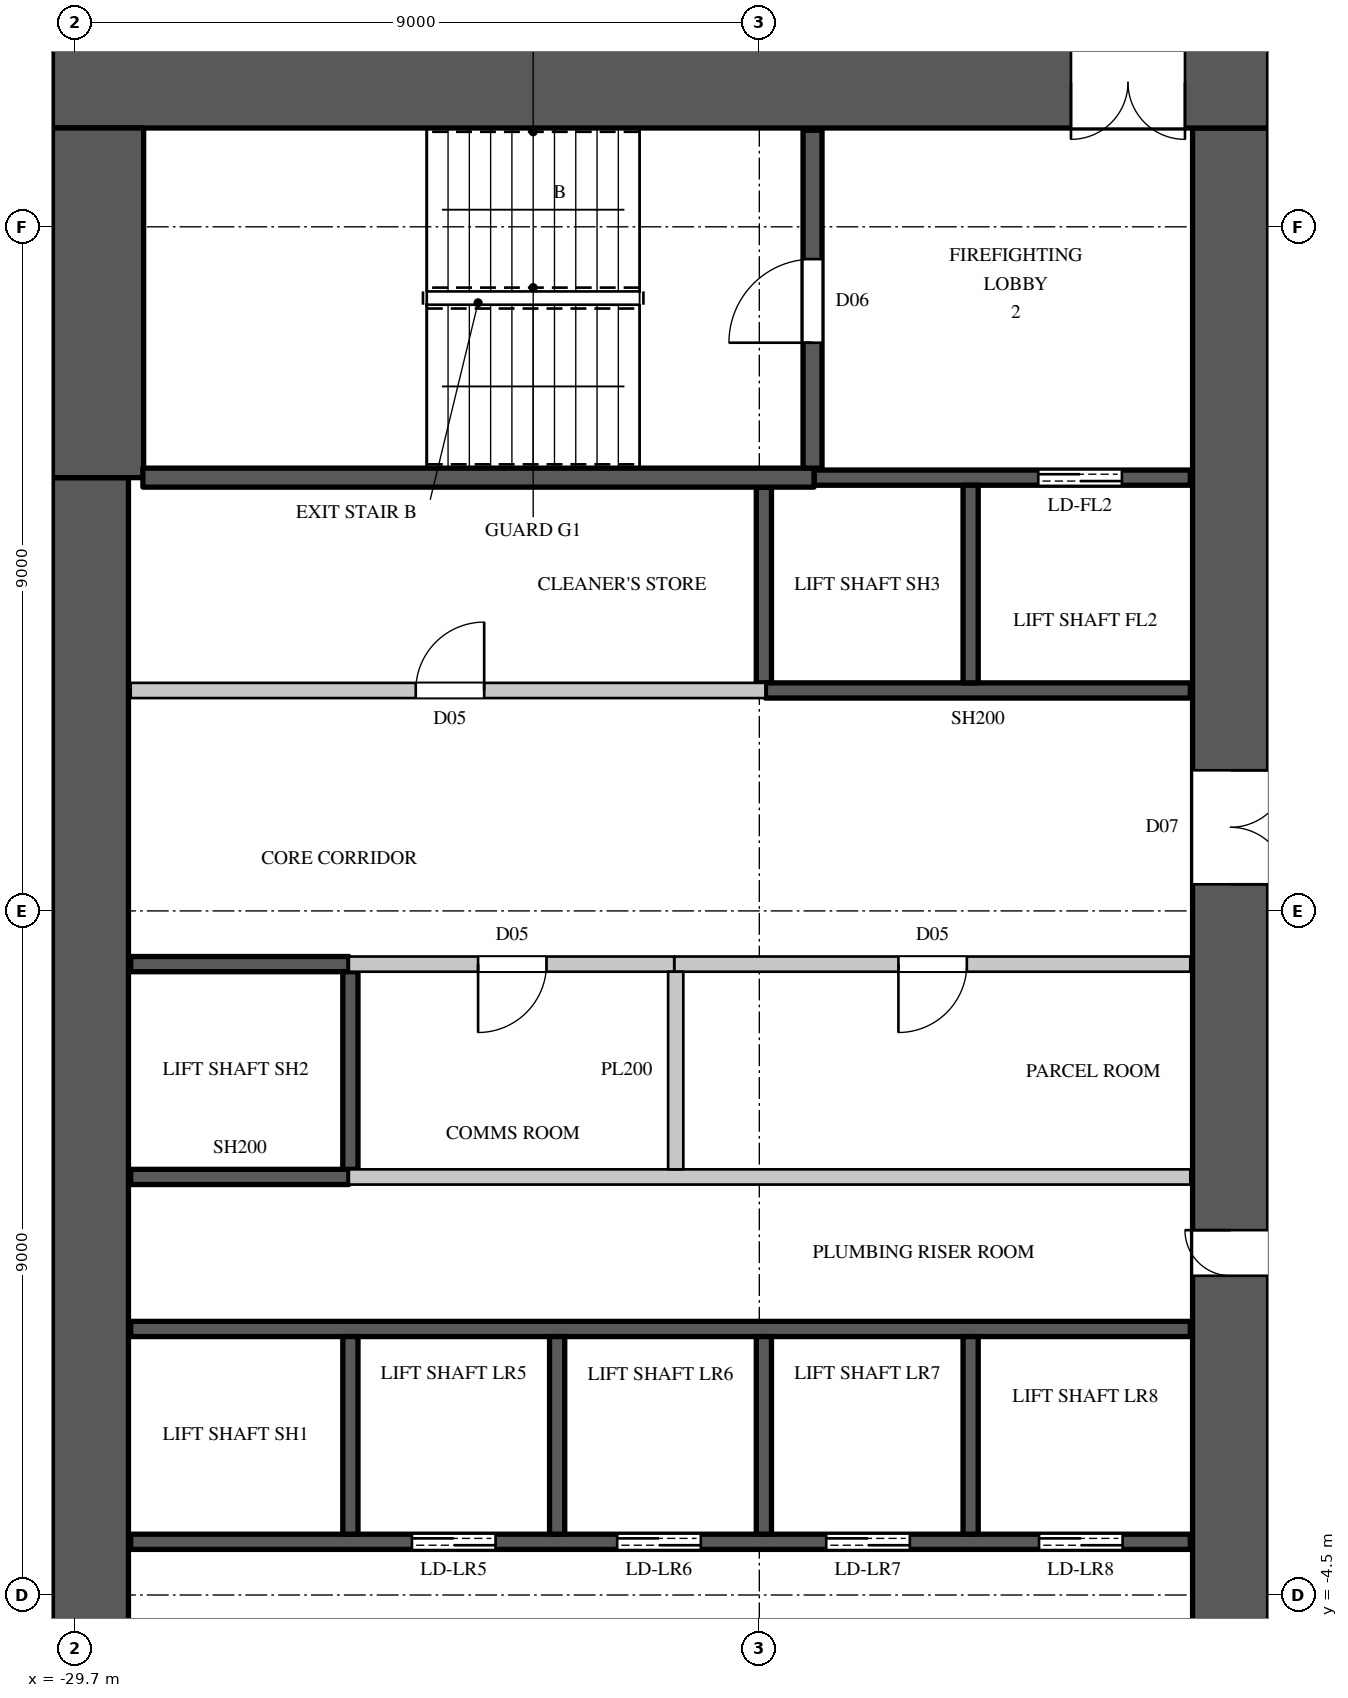
"""IFC4 building model, lengths in metres.
Left out: names, types, materials, properties, quantities, classifications, styles, units other than length and angle.
Written with IfcOpenShell. Run it as: python <this file> out.ifc"""

import sys

from ifc_helpers import new_model, si_unit, direction, frame, frame_2d, origin, place, context, subcontext, project, spatial, rectangle, extrude, element, fill, save


model = new_model("IFC4")
c1 = context("Model", 3, precision=1e-05, world=origin(), true_north=direction((0.0, 1.0)))
c2 = subcontext(c1, "Body", "Model", "MODEL_VIEW")
j1 = project(units=[si_unit("LENGTHUNIT", "METRE"), si_unit("PLANEANGLEUNIT", "RADIAN")], contexts=[c1])
p1 = place(None, origin())
s1 = spatial("IfcSite", under=j1, at=p1, CompositionType="ELEMENT")
p2 = place(p1, origin())
s2 = spatial("IfcBuilding", under=s1, at=p2, CompositionType="ELEMENT")
p3 = place(p2, frame((0.0, 0.0, 102.3)))
s3 = spatial("IfcBuildingStorey", under=s2, at=p3, CompositionType="ELEMENT", Elevation=102.3)
p4 = place(p3, frame((-30.0, 15.4, 0.0), z_axis=(0.0, 0.0, 1.0), x_axis=(1.0, 0.0, 0.0)))
e1 = element("IfcWall", 1, at=p4, inside=s3, PredefinedType="SHEAR", context=c2, shape_type="SweptSolid", body=[
    extrude(rectangle(XDim=16.0, YDim=1.2, at=frame_2d((8.0, 0.0))), origin(), (0.0, 0.0, 1.0), 3.6),
])
p5 = place(p4, frame((13.4, 0.0, 0.0)))
e2 = element("IfcOpeningElement", 2, at=p5, cuts=e1, PredefinedType="OPENING", context=c2, shape_type="SweptSolid", body=[
    extrude(rectangle(XDim=1.5, YDim=2.4, at=frame_2d((0.75, 1.2))), frame((0.0, 0.61, 0.0), z_axis=(0.0, -1.0, 0.0), x_axis=(1.0, 0.0, 0.0)), (0.0, 0.0, 1.0), 1.22),
])
p6 = place(p3, frame((-14.5, -14.8, 0.0), z_axis=(0.0, 0.0, 1.0), x_axis=(0.0, 1.0, 0.0)))
e3 = element("IfcWall", 3, at=p6, inside=s3, PredefinedType="SHEAR", context=c2, shape_type="SweptSolid", body=[
    extrude(rectangle(XDim=29.6, YDim=1.0, at=frame_2d((14.8, 0.0))), origin(), (0.0, 0.0, 1.0), 3.6),
])
p7 = place(p6, frame((8.45, 0.0, 0.0)))
e4 = element("IfcOpeningElement", 4, at=p7, cuts=e3, PredefinedType="OPENING", context=c2, shape_type="SweptSolid", body=[
    extrude(rectangle(XDim=1.5, YDim=2.4, at=frame_2d((0.75, 1.2))), frame((0.0, 0.51, 0.0), z_axis=(0.0, -1.0, 0.0), x_axis=(1.0, 0.0, 0.0)), (0.0, 0.0, 1.0), 1.02),
])
p8 = place(p6, frame((19.65, 0.0, 0.0)))
e5 = element("IfcOpeningElement", 5, at=p8, cuts=e3, PredefinedType="OPENING", context=c2, shape_type="SweptSolid", body=[
    extrude(rectangle(XDim=1.5, YDim=2.4, at=frame_2d((0.75, 1.2))), frame((0.0, 0.51, 0.0), z_axis=(0.0, -1.0, 0.0), x_axis=(1.0, 0.0, 0.0)), (0.0, 0.0, 1.0), 1.02),
])
p9 = place(p6, frame((14.5, 0.0, 0.0)))
e6 = element("IfcOpeningElement", 6, at=p9, cuts=e3, PredefinedType="OPENING", context=c2, shape_type="SweptSolid", body=[
    extrude(rectangle(XDim=0.6, YDim=2.0, at=frame_2d((0.3, 1.0))), frame((0.0, 0.51, 0.0), z_axis=(0.0, -1.0, 0.0), x_axis=(1.0, 0.0, 0.0)), (0.0, 0.0, 1.0), 1.02),
])
p10 = place(p3, frame((-29.5, -10.2, 0.0), z_axis=(0.0, 0.0, 1.0), x_axis=(0.0, 1.0, 0.0)))
e7 = element("IfcWall", 7, at=p10, inside=s3, PredefinedType="SHEAR", context=c2, shape_type="SweptSolid", body=[
    extrude(rectangle(XDim=20.4, YDim=1.0, at=frame_2d((10.2, 0.0))), origin(), (0.0, 0.0, 1.0), 3.6),
])
p11 = place(p3, frame((-29.4, 10.2, 0.0), z_axis=(0.0, 0.0, 1.0), x_axis=(0.0, 1.0, 0.0)))
e8 = element("IfcWall", 8, at=p11, inside=s3, PredefinedType="SHEAR", context=c2, shape_type="SweptSolid", body=[
    extrude(rectangle(XDim=4.6, YDim=1.2, at=frame_2d((2.3, 0.0))), origin(), (0.0, 0.0, 1.0), 3.6),
])
p12 = place(p3, frame((-28.97, 7.4, 0.0), z_axis=(0.0, 0.0, 1.0), x_axis=(1.0, 0.0, 0.0)))
e9 = element("IfcWall", 9, at=p12, inside=s3, PredefinedType="PARTITIONING", context=c2, shape_type="SweptSolid", body=[
    extrude(rectangle(XDim=8.35, YDim=0.2, at=frame_2d((4.175, 0.0))), origin(), (0.0, 0.0, 1.0), 3.3),
])
p13 = place(p12, frame((3.75, 0.0, 0.0)))
e10 = element("IfcOpeningElement", 10, at=p13, cuts=e9, PredefinedType="OPENING", context=c2, shape_type="SweptSolid", body=[
    extrude(rectangle(XDim=0.9, YDim=2.2, at=frame_2d((0.45, 1.1))), frame((0.0, 0.11, 0.0), z_axis=(0.0, -1.0, 0.0), x_axis=(1.0, 0.0, 0.0)), (0.0, 0.0, 1.0), 0.22),
])
p14 = place(p3, frame((-21.82, 3.8, 0.0), z_axis=(0.0, 0.0, 1.0), x_axis=(1.0, 0.0, 0.0)))
e11 = element("IfcWall", 11, at=p14, inside=s3, PredefinedType="PARTITIONING", context=c2, shape_type="SweptSolid", body=[
    extrude(rectangle(XDim=6.79, YDim=0.2, at=frame_2d((3.395, 0.0))), origin(), (0.0, 0.0, 1.0), 3.3),
])
p15 = place(p14, frame((2.95, 0.0, 0.0)))
e12 = element("IfcOpeningElement", 12, at=p15, cuts=e11, PredefinedType="OPENING", context=c2, shape_type="SweptSolid", body=[
    extrude(rectangle(XDim=0.9, YDim=2.2, at=frame_2d((0.45, 1.1))), frame((0.0, 0.11, 0.0), z_axis=(0.0, -1.0, 0.0), x_axis=(1.0, 0.0, 0.0)), (0.0, 0.0, 1.0), 0.22),
])
p16 = place(p3, frame((-26.1, 1.0, 0.0), z_axis=(0.0, 0.0, 1.0), x_axis=(1.0, 0.0, 0.0)))
e13 = element("IfcWall", 13, at=p16, inside=s3, PredefinedType="PARTITIONING", context=c2, shape_type="SweptSolid", body=[
    extrude(rectangle(XDim=11.07, YDim=0.2, at=frame_2d((5.535, 0.0))), origin(), (0.0, 0.0, 1.0), 3.3),
])
p17 = place(p3, frame((-26.1, 3.8, 0.0), z_axis=(0.0, 0.0, 1.0), x_axis=(1.0, 0.0, 0.0)))
e14 = element("IfcWall", 14, at=p17, inside=s3, PredefinedType="PARTITIONING", context=c2, shape_type="SweptSolid", body=[
    extrude(rectangle(XDim=4.28, YDim=0.2, at=frame_2d((2.14, 0.0))), origin(), (0.0, 0.0, 1.0), 3.3),
])
p18 = place(p17, frame((1.7, 0.0, 0.0)))
e15 = element("IfcOpeningElement", 15, at=p18, cuts=e14, PredefinedType="OPENING", context=c2, shape_type="SweptSolid", body=[
    extrude(rectangle(XDim=0.9, YDim=2.2, at=frame_2d((0.45, 1.1))), frame((0.0, 0.11, 0.0), z_axis=(0.0, -1.0, 0.0), x_axis=(1.0, 0.0, 0.0)), (0.0, 0.0, 1.0), 0.22),
])
p19 = place(p3, frame((-21.8, 1.1, 0.0), z_axis=(0.0, 0.0, 1.0), x_axis=(0.0, 1.0, 0.0)))
e16 = element("IfcWall", 16, at=p19, inside=s3, PredefinedType="PARTITIONING", context=c2, shape_type="SweptSolid", body=[
    extrude(rectangle(XDim=2.6, YDim=0.2, at=frame_2d((1.3, 0.0))), origin(), (0.0, 0.0, 1.0), 3.3),
])
p20 = place(p3, frame((-28.97, -3.8, 0.0), z_axis=(0.0, 0.0, 1.0), x_axis=(1.0, 0.0, 0.0)))
e17 = element("IfcWall", 17, at=p20, inside=s3, PredefinedType="SHEAR", context=c2, shape_type="SweptSolid", body=[
    extrude(rectangle(XDim=13.94, YDim=0.2, at=frame_2d((6.97, 0.0))), origin(), (0.0, 0.0, 1.0), 3.3),
])
p21 = place(p20, frame((3.7, 0.0, 0.0)))
e18 = element("IfcOpeningElement", 18, at=p21, cuts=e17, PredefinedType="OPENING", context=c2, shape_type="SweptSolid", body=[
    extrude(rectangle(XDim=1.1, YDim=2.2, at=frame_2d((0.55, 1.1))), frame((0.0, 0.11, 0.0), z_axis=(0.0, -1.0, 0.0), x_axis=(1.0, 0.0, 0.0)), (0.0, 0.0, 1.0), 0.22),
])
p22 = place(p20, frame((6.4, 0.0, 0.0)))
e19 = element("IfcOpeningElement", 19, at=p22, cuts=e17, PredefinedType="OPENING", context=c2, shape_type="SweptSolid", body=[
    extrude(rectangle(XDim=1.1, YDim=2.2, at=frame_2d((0.55, 1.1))), frame((0.0, 0.11, 0.0), z_axis=(0.0, -1.0, 0.0), x_axis=(1.0, 0.0, 0.0)), (0.0, 0.0, 1.0), 0.22),
])
p23 = place(p20, frame((9.15, 0.0, 0.0)))
e20 = element("IfcOpeningElement", 20, at=p23, cuts=e17, PredefinedType="OPENING", context=c2, shape_type="SweptSolid", body=[
    extrude(rectangle(XDim=1.1, YDim=2.2, at=frame_2d((0.55, 1.1))), frame((0.0, 0.11, 0.0), z_axis=(0.0, -1.0, 0.0), x_axis=(1.0, 0.0, 0.0)), (0.0, 0.0, 1.0), 0.22),
])
p24 = place(p20, frame((11.95, 0.0, 0.0)))
e21 = element("IfcOpeningElement", 21, at=p24, cuts=e17, PredefinedType="OPENING", context=c2, shape_type="SweptSolid", body=[
    extrude(rectangle(XDim=1.1, YDim=2.2, at=frame_2d((0.55, 1.1))), frame((0.0, 0.11, 0.0), z_axis=(0.0, -1.0, 0.0), x_axis=(1.0, 0.0, 0.0)), (0.0, 0.0, 1.0), 0.22),
])
p25 = place(p3, frame((-28.97, -1.0, 0.0), z_axis=(0.0, 0.0, 1.0), x_axis=(1.0, 0.0, 0.0)))
e22 = element("IfcWall", 22, at=p25, inside=s3, PredefinedType="SHEAR", context=c2, shape_type="SweptSolid", body=[
    extrude(rectangle(XDim=13.94, YDim=0.2, at=frame_2d((6.97, 0.0))), origin(), (0.0, 0.0, 1.0), 3.3),
])
for number, where, z_axis, x_axis in (
    (23, (-28.97, 1.0, 0.0), (0.0, 0.0, 1.0), (1.0, 0.0, 0.0)),
    (24, (-28.97, 3.8, 0.0), (0.0, 0.0, 1.0), (1.0, 0.0, 0.0)),
):
    element("IfcWall", number, at=place(p3, frame(where, z_axis=z_axis, x_axis=x_axis)), inside=s3, PredefinedType="SHEAR", context=c2, shape_type="SweptSolid", body=[
        extrude(rectangle(XDim=2.87, YDim=0.2, at=frame_2d((1.435, 0.0))), origin(), (0.0, 0.0, 1.0), 3.3),
    ])
p26 = place(p3, frame((-26.08, -3.7, 0.0), z_axis=(0.0, 0.0, 1.0), x_axis=(0.0, 1.0, 0.0)))
e25 = element("IfcWall", 25, at=p26, inside=s3, PredefinedType="SHEAR", context=c2, shape_type="SweptSolid", body=[
    extrude(rectangle(XDim=2.6, YDim=0.2, at=frame_2d((1.3, 0.0))), origin(), (0.0, 0.0, 1.0), 3.6),
])
p27 = place(p3, frame((-26.08, 1.1, 0.0), z_axis=(0.0, 0.0, 1.0), x_axis=(0.0, 1.0, 0.0)))
e26 = element("IfcWall", 26, at=p27, inside=s3, PredefinedType="SHEAR", context=c2, shape_type="SweptSolid", body=[
    extrude(rectangle(XDim=2.6, YDim=0.2, at=frame_2d((1.3, 0.0))), origin(), (0.0, 0.0, 1.0), 3.3),
])
for number, where, z_axis, x_axis in (
    (27, (-23.36, -3.7, 0.0), (0.0, 0.0, 1.0), (0.0, 1.0, 0.0)),
    (28, (-20.64, -3.7, 0.0), (0.0, 0.0, 1.0), (0.0, 1.0, 0.0)),
):
    element("IfcWall", number, at=place(p3, frame(where, z_axis=z_axis, x_axis=x_axis)), inside=s3, PredefinedType="SHEAR", context=c2, shape_type="SweptSolid", body=[
        extrude(rectangle(XDim=2.6, YDim=0.2, at=frame_2d((1.3, 0.0))), origin(), (0.0, 0.0, 1.0), 3.6),
    ])
p28 = place(p3, frame((-20.64, 7.5, 0.0), z_axis=(0.0, 0.0, 1.0), x_axis=(0.0, 1.0, 0.0)))
e29 = element("IfcWall", 29, at=p28, inside=s3, PredefinedType="SHEAR", context=c2, shape_type="SweptSolid", body=[
    extrude(rectangle(XDim=2.575, YDim=0.2, at=frame_2d((1.288, 0.0))), origin(), (0.0, 0.0, 1.0), 3.3),
])
p29 = place(p3, frame((-20.62, 7.4, 0.0), z_axis=(0.0, 0.0, 1.0), x_axis=(1.0, 0.0, 0.0)))
e30 = element("IfcWall", 30, at=p29, inside=s3, PredefinedType="SHEAR", context=c2, shape_type="SweptSolid", body=[
    extrude(rectangle(XDim=5.59, YDim=0.2, at=frame_2d((2.795, 0.0))), origin(), (0.0, 0.0, 1.0), 3.3),
])
p30 = place(p3, frame((-19.98, 10.2, 0.0), z_axis=(0.0, 0.0, 1.0), x_axis=(1.0, 0.0, 0.0)))
e31 = element("IfcWall", 31, at=p30, inside=s3, PredefinedType="SHEAR", context=c2, shape_type="SweptSolid", body=[
    extrude(rectangle(XDim=4.95, YDim=0.2, at=frame_2d((2.475, 0.0))), origin(), (0.0, 0.0, 1.0), 3.3),
])
p31 = place(p30, frame((2.95, 0.0, 0.0)))
e32 = element("IfcOpeningElement", 32, at=p31, cuts=e31, PredefinedType="OPENING", context=c2, shape_type="SweptSolid", body=[
    extrude(rectangle(XDim=1.1, YDim=2.2, at=frame_2d((0.55, 1.1))), frame((0.0, 0.11, 0.0), z_axis=(0.0, -1.0, 0.0), x_axis=(1.0, 0.0, 0.0)), (0.0, 0.0, 1.0), 0.22),
])
p32 = place(p3, frame((-17.92, -3.7, 0.0), z_axis=(0.0, 0.0, 1.0), x_axis=(0.0, 1.0, 0.0)))
e33 = element("IfcWall", 33, at=p32, inside=s3, PredefinedType="SHEAR", context=c2, shape_type="SweptSolid", body=[
    extrude(rectangle(XDim=2.6, YDim=0.2, at=frame_2d((1.3, 0.0))), origin(), (0.0, 0.0, 1.0), 3.6),
])
p33 = place(p3, frame((-17.92, 7.5, 0.0), z_axis=(0.0, 0.0, 1.0), x_axis=(0.0, 1.0, 0.0)))
e34 = element("IfcWall", 34, at=p33, inside=s3, PredefinedType="SHEAR", context=c2, shape_type="SweptSolid", body=[
    extrude(rectangle(XDim=2.6, YDim=0.2, at=frame_2d((1.3, 0.0))), origin(), (0.0, 0.0, 1.0), 3.6),
])
p34 = place(p3, frame((-28.81, 10.2, 0.0), z_axis=(0.0, 0.0, 1.0), x_axis=(1.0, 0.0, 0.0)))
e35 = element("IfcWall", 35, at=p34, inside=s3, PredefinedType="SHEAR", context=c2, shape_type="SweptSolid", body=[
    extrude(rectangle(XDim=8.83, YDim=0.25, at=frame_2d((4.415, 0.0))), origin(), (0.0, 0.0, 1.0), 3.3),
])
p35 = place(p3, frame((-20.0, 10.325, 0.0), z_axis=(0.0, 0.0, 1.0), x_axis=(0.0, 1.0, 0.0)))
e36 = element("IfcWall", 36, at=p35, inside=s3, PredefinedType="SHEAR", context=c2, shape_type="SweptSolid", body=[
    extrude(rectangle(XDim=4.445, YDim=0.25, at=frame_2d((2.223, 0.0))), origin(), (0.0, 0.0, 1.0), 3.3),
])
p36 = place(p35, frame((1.65, 0.0, 0.0)))
e37 = element("IfcOpeningElement", 37, at=p36, cuts=e36, PredefinedType="OPENING", context=c2, shape_type="SweptSolid", body=[
    extrude(rectangle(XDim=1.1, YDim=2.2, at=frame_2d((0.55, 1.1))), frame((0.0, 0.135, 0.0), z_axis=(0.0, -1.0, 0.0), x_axis=(1.0, 0.0, 0.0)), (0.0, 0.0, 1.0), 0.27),
])
p37 = place(p36, origin())
e38 = element("IfcDoor", 38, at=p37, inside=s3, OperationType="SINGLE_SWING_LEFT", PredefinedType="DOOR", context=c2, shape_type="SweptSolid", body=[
    extrude(rectangle(XDim=1.1, YDim=2.2, at=frame_2d((0.55, 1.1))), frame((0.0, 0.025, 0.0), z_axis=(0.0, -1.0, 0.0), x_axis=(1.0, 0.0, 0.0)), (0.0, 0.0, 1.0), 0.05),
])
fill(e37, e38)
p38 = place(p18, origin())
e39 = element("IfcDoor", 39, at=p38, inside=s3, OperationType="SINGLE_SWING_RIGHT", PredefinedType="DOOR", context=c2, shape_type="SweptSolid", body=[
    extrude(rectangle(XDim=0.9, YDim=2.2, at=frame_2d((0.45, 1.1))), frame((0.0, 0.025, 0.0), z_axis=(0.0, -1.0, 0.0), x_axis=(1.0, 0.0, 0.0)), (0.0, 0.0, 1.0), 0.05),
])
fill(e15, e39)
p39 = place(p15, origin())
e40 = element("IfcDoor", 40, at=p39, inside=s3, OperationType="SINGLE_SWING_RIGHT", PredefinedType="DOOR", context=c2, shape_type="SweptSolid", body=[
    extrude(rectangle(XDim=0.9, YDim=2.2, at=frame_2d((0.45, 1.1))), frame((0.0, 0.025, 0.0), z_axis=(0.0, -1.0, 0.0), x_axis=(1.0, 0.0, 0.0)), (0.0, 0.0, 1.0), 0.05),
])
fill(e12, e40)
p40 = place(p13, origin())
e41 = element("IfcDoor", 41, at=p40, inside=s3, OperationType="SINGLE_SWING_RIGHT", PredefinedType="DOOR", context=c2, shape_type="SweptSolid", body=[
    extrude(rectangle(XDim=0.9, YDim=2.2, at=frame_2d((0.45, 1.1))), frame((0.0, 0.025, 0.0), z_axis=(0.0, -1.0, 0.0), x_axis=(1.0, 0.0, 0.0)), (0.0, 0.0, 1.0), 0.05),
])
fill(e10, e41)
p41 = place(p21, origin())
e42 = element("IfcDoor", 42, at=p41, inside=s3, OperationType="DOUBLE_DOOR_SLIDING", PredefinedType="DOOR", context=c2, shape_type="SweptSolid", body=[
    extrude(rectangle(XDim=1.1, YDim=2.2, at=frame_2d((0.55, 1.1))), frame((0.0, 0.025, 0.0), z_axis=(0.0, -1.0, 0.0), x_axis=(1.0, 0.0, 0.0)), (0.0, 0.0, 1.0), 0.05),
])
fill(e18, e42)
p42 = place(p22, origin())
e43 = element("IfcDoor", 43, at=p42, inside=s3, OperationType="DOUBLE_DOOR_SLIDING", PredefinedType="DOOR", context=c2, shape_type="SweptSolid", body=[
    extrude(rectangle(XDim=1.1, YDim=2.2, at=frame_2d((0.55, 1.1))), frame((0.0, 0.025, 0.0), z_axis=(0.0, -1.0, 0.0), x_axis=(1.0, 0.0, 0.0)), (0.0, 0.0, 1.0), 0.05),
])
fill(e19, e43)
p43 = place(p23, origin())
e44 = element("IfcDoor", 44, at=p43, inside=s3, OperationType="DOUBLE_DOOR_SLIDING", PredefinedType="DOOR", context=c2, shape_type="SweptSolid", body=[
    extrude(rectangle(XDim=1.1, YDim=2.2, at=frame_2d((0.55, 1.1))), frame((0.0, 0.025, 0.0), z_axis=(0.0, -1.0, 0.0), x_axis=(1.0, 0.0, 0.0)), (0.0, 0.0, 1.0), 0.05),
])
fill(e20, e44)
p44 = place(p24, origin())
e45 = element("IfcDoor", 45, at=p44, inside=s3, OperationType="DOUBLE_DOOR_SLIDING", PredefinedType="DOOR", context=c2, shape_type="SweptSolid", body=[
    extrude(rectangle(XDim=1.1, YDim=2.2, at=frame_2d((0.55, 1.1))), frame((0.0, 0.025, 0.0), z_axis=(0.0, -1.0, 0.0), x_axis=(1.0, 0.0, 0.0)), (0.0, 0.0, 1.0), 0.05),
])
fill(e21, e45)
p45 = place(p31, origin())
e46 = element("IfcDoor", 46, at=p45, inside=s3, OperationType="DOUBLE_DOOR_SLIDING", PredefinedType="DOOR", context=c2, shape_type="SweptSolid", body=[
    extrude(rectangle(XDim=1.1, YDim=2.2, at=frame_2d((0.55, 1.1))), frame((0.0, 0.025, 0.0), z_axis=(0.0, -1.0, 0.0), x_axis=(1.0, 0.0, 0.0)), (0.0, 0.0, 1.0), 0.05),
])
fill(e32, e46)
p46 = place(p5, origin())
e47 = element("IfcDoor", 47, at=p46, inside=s3, OperationType="DOUBLE_DOOR_SINGLE_SWING", PredefinedType="DOOR", context=c2, shape_type="SweptSolid", body=[
    extrude(rectangle(XDim=1.5, YDim=2.4, at=frame_2d((0.75, 1.2))), frame((0.0, 0.025, 0.0), z_axis=(0.0, -1.0, 0.0), x_axis=(1.0, 0.0, 0.0)), (0.0, 0.0, 1.0), 0.05),
])
fill(e2, e47)
p47 = place(p8, origin())
e48 = element("IfcDoor", 48, at=p47, inside=s3, OperationType="DOUBLE_DOOR_SINGLE_SWING", PredefinedType="DOOR", context=c2, shape_type="SweptSolid", body=[
    extrude(rectangle(XDim=1.5, YDim=2.4, at=frame_2d((0.75, 1.2))), frame((0.0, -0.445, 0.0), z_axis=(0.0, -1.0, 0.0), x_axis=(1.0, 0.0, 0.0)), (0.0, 0.0, 1.0), 0.05),
])
fill(e5, e48)
p48 = place(p9, origin())
e49 = element("IfcDoor", 49, at=p48, inside=s3, OperationType="SINGLE_SWING_RIGHT", PredefinedType="DOOR", context=c2, shape_type="SweptSolid", body=[
    extrude(rectangle(XDim=0.6, YDim=2.0, at=frame_2d((0.3, 1.0))), frame((0.0, 0.495, 0.0), z_axis=(0.0, -1.0, 0.0), x_axis=(1.0, 0.0, 0.0)), (0.0, 0.0, 1.0), 0.05),
])
fill(e6, e49)
save(model, sys.argv[1])
